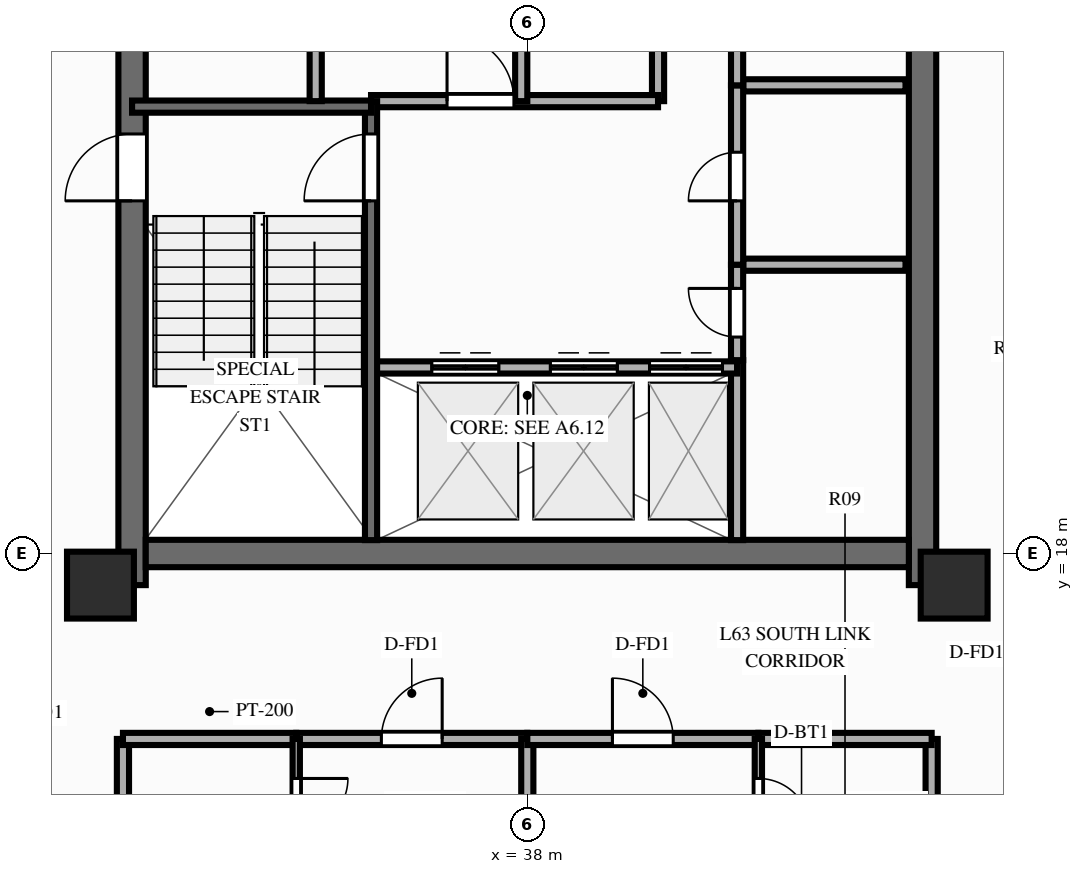
"""IFC4 building model, lengths in metres.
Left out: names, types, materials, properties, quantities, classifications, styles, units other than length and angle.
Written with IfcOpenShell. Run it as: python <this file> out.ifc"""

import sys

from ifc_helpers import new_model, si_unit, direction, frame, frame_2d, origin, origin_2d, place, context, subcontext, project, spatial, rectangle, extrude, source, transform, mapped, element, fill, save


model = new_model("IFC4")
c1 = context("Model", 3, precision=1e-05, world=origin(), true_north=direction((0.0, 1.0)))
c2 = subcontext(c1, "Body", "Model", "MODEL_VIEW")
j1 = project(units=[si_unit("LENGTHUNIT", "METRE"), si_unit("PLANEANGLEUNIT", "RADIAN")], contexts=[c1])
p1 = place(None, origin())
s1 = spatial("IfcSite", under=j1, at=p1, CompositionType="ELEMENT")
p2 = place(p1, origin())
s2 = spatial("IfcBuilding", under=s1, at=p2, CompositionType="ELEMENT")
p3 = place(p2, frame((0.0, 0.0, 202.6)))
s3 = spatial("IfcBuildingStorey", under=s2, at=p3, CompositionType="ELEMENT", Elevation=202.6)
p4 = place(p3, frame((31.5, 17.48, 0.0), z_axis=(0.0, 0.0, 1.0), x_axis=(0.0, 1.0, 0.0)))
e1 = element("IfcWall", 1, at=p4, inside=s3, PredefinedType="SHEAR", context=c2, shape_type="SweptSolid", body=[
    extrude(rectangle(XDim=19.04, YDim=0.45, at=frame_2d((9.52, 0.0))), origin(), (0.0, 0.0, 1.0), 3.9),
])
p5 = place(p4, frame((6.32, 0.0, 0.0)))
e2 = element("IfcOpeningElement", 2, at=p5, cuts=e1, PredefinedType="OPENING", context=c2, shape_type="SweptSolid", body=[
    extrude(rectangle(XDim=1.1, YDim=2.15, at=frame_2d((0.55, 1.075))), frame((0.0, 0.237, 0.0), z_axis=(0.0, -1.0, 0.0), x_axis=(1.0, 0.0, 0.0)), (0.0, 0.0, 1.0), 0.474),
])
p6 = place(p3, frame((44.5, 17.48, 0.0), z_axis=(0.0, 0.0, 1.0), x_axis=(0.0, 1.0, 0.0)))
e3 = element("IfcWall", 3, at=p6, inside=s3, PredefinedType="SHEAR", context=c2, shape_type="SweptSolid", body=[
    extrude(rectangle(XDim=19.04, YDim=0.45, at=frame_2d((9.52, 0.0))), origin(), (0.0, 0.0, 1.0), 3.9),
])
p7 = place(p6, frame((12.67, 0.0, 0.0), z_axis=(0.0, 0.0, 1.0), x_axis=(-1.0, 0.0, 0.0)))
e4 = element("IfcOpeningElement", 4, at=p7, cuts=e3, PredefinedType="OPENING", context=c2, shape_type="SweptSolid", body=[
    extrude(rectangle(XDim=1.1, YDim=2.15, at=frame_2d((0.55, 1.075))), frame((0.0, 0.237, 0.0), z_axis=(0.0, -1.0, 0.0), x_axis=(1.0, 0.0, 0.0)), (0.0, 0.0, 1.0), 0.474),
])
p8 = place(p3, frame((31.725, 18.0, 0.0), z_axis=(0.0, 0.0, 1.0), x_axis=(1.0, 0.0, 0.0)))
e5 = element("IfcWall", 5, at=p8, inside=s3, PredefinedType="SHEAR", context=c2, shape_type="SweptSolid", body=[
    extrude(rectangle(XDim=12.55, YDim=0.45, at=frame_2d((6.275, 0.0))), origin(), (0.0, 0.0, 1.0), 3.9),
])
m1 = source(origin(), c2, "Body", "SweptSolid", [
    extrude(rectangle(XDim=1.1, YDim=1.1, at=origin_2d()), origin(), (0.0, 0.0, 1.0), 3.9),
])
for number, where, z_axis, x_axis in (
    (6, (30.98, 17.48, 0.0), (0.0, 0.0, 1.0), (1.0, 0.0, 0.0)),
    (7, (45.02, 17.48, 0.0), (0.0, 0.0, 1.0), (1.0, 0.0, 0.0)),
):
    element("IfcColumn", number, at=place(p3, frame(where, z_axis=z_axis, x_axis=x_axis)), inside=s3, PredefinedType="COLUMN", context=c2, shape_type="MappedRepresentation", body=[
        mapped(m1, transform((0.0, 0.0, 0.0), scale=1.0)),
    ])
p9 = place(p3, frame((41.55, 22.75, 0.0), z_axis=(0.0, 0.0, 1.0), x_axis=(1.0, 0.0, 0.0)))
e8 = element("IfcWall", 8, at=p9, inside=s3, PredefinedType="PARTITIONING", context=c2, shape_type="SweptSolid", body=[
    extrude(rectangle(XDim=2.67, YDim=0.2, at=frame_2d((1.335, 0.0))), origin(), (0.0, 0.0, 1.0), 3.6),
])
p10 = place(p3, frame((41.55, 25.7, 0.0), z_axis=(0.0, 0.0, 1.0), x_axis=(1.0, 0.0, 0.0)))
e9 = element("IfcWall", 9, at=p10, inside=s3, PredefinedType="PARTITIONING", context=c2, shape_type="SweptSolid", body=[
    extrude(rectangle(XDim=2.67, YDim=0.2, at=frame_2d((1.335, 0.0))), origin(), (0.0, 0.0, 1.0), 3.04),
])
p11 = place(p3, frame((41.45, 18.22, 0.0), z_axis=(0.0, 0.0, 1.0), x_axis=(0.0, 1.0, 0.0)))
e10 = element("IfcWall", 10, at=p11, inside=s3, PredefinedType="PARTITIONING", context=c2, shape_type="SweptSolid", body=[
    extrude(rectangle(XDim=2.96, YDim=0.2, at=frame_2d((1.48, 0.0))), origin(), (0.0, 0.0, 1.0), 3.6),
])
p12 = place(p3, frame((41.45, 21.18, 0.0), z_axis=(0.0, 0.0, 1.0), x_axis=(0.0, 1.0, 0.0)))
e11 = element("IfcWall", 11, at=p12, inside=s3, PredefinedType="PARTITIONING", context=c2, shape_type="SweptSolid", body=[
    extrude(rectangle(XDim=1.57, YDim=0.2, at=frame_2d((0.785, 0.0))), origin(), (0.0, 0.0, 1.0), 3.6),
])
p13 = place(p12, frame((0.38, 0.0, 0.0)))
e12 = element("IfcOpeningElement", 12, at=p13, cuts=e11, PredefinedType="OPENING", context=c2, shape_type="SweptSolid", body=[
    extrude(rectangle(XDim=0.8, YDim=2.05, at=frame_2d((0.4, 1.025))), frame((0.0, 0.112, 0.0), z_axis=(0.0, -1.0, 0.0), x_axis=(1.0, 0.0, 0.0)), (0.0, 0.0, 1.0), 0.224),
])
p14 = place(p3, frame((41.45, 22.75, 0.0), z_axis=(0.0, 0.0, 1.0), x_axis=(0.0, 1.0, 0.0)))
e13 = element("IfcWall", 13, at=p14, inside=s3, PredefinedType="PARTITIONING", context=c2, shape_type="SweptSolid", body=[
    extrude(rectangle(XDim=2.95, YDim=0.2, at=frame_2d((1.475, 0.0))), origin(), (0.0, 0.0, 1.0), 3.6),
])
p15 = place(p14, frame((1.05, 0.0, 0.0)))
e14 = element("IfcOpeningElement", 14, at=p15, cuts=e13, PredefinedType="OPENING", context=c2, shape_type="SweptSolid", body=[
    extrude(rectangle(XDim=0.8, YDim=2.05, at=frame_2d((0.4, 1.025))), frame((0.0, 0.112, 0.0), z_axis=(0.0, -1.0, 0.0), x_axis=(1.0, 0.0, 0.0)), (0.0, 0.0, 1.0), 0.224),
])
p16 = place(p3, frame((41.45, 25.7, 0.0), z_axis=(0.0, 0.0, 1.0), x_axis=(0.0, 1.0, 0.0)))
e15 = element("IfcWall", 15, at=p16, inside=s3, PredefinedType="PARTITIONING", context=c2, shape_type="SweptSolid", body=[
    extrude(rectangle(XDim=2.9, YDim=0.2, at=frame_2d((1.45, 0.0))), origin(), (0.0, 0.0, 1.0), 3.6),
])
p17 = place(p16, frame((1.0, 0.0, 0.0)))
e16 = element("IfcOpeningElement", 16, at=p17, cuts=e15, PredefinedType="OPENING", context=c2, shape_type="SweptSolid", body=[
    extrude(rectangle(XDim=0.9, YDim=2.1, at=frame_2d((0.45, 1.05))), frame((0.0, 0.112, 0.0), z_axis=(0.0, -1.0, 0.0), x_axis=(1.0, 0.0, 0.0)), (0.0, 0.0, 1.0), 0.224),
])
p18 = place(p3, frame((40.15, 25.44, 0.0), z_axis=(0.0, 0.0, 1.0), x_axis=(0.0, 1.0, 0.0)))
e17 = element("IfcWall", 17, at=p18, inside=s3, PredefinedType="PARTITIONING", context=c2, shape_type="SweptSolid", body=[
    extrude(rectangle(XDim=6.36, YDim=0.2, at=frame_2d((3.18, 0.0))), origin(), (0.0, 0.0, 1.0), 3.6),
])
p19 = place(p3, frame((35.43, 21.06, 0.0), z_axis=(0.0, 0.0, 1.0), x_axis=(1.0, 0.0, 0.0)))
e18 = element("IfcWall", 18, at=p19, inside=s3, PredefinedType="PARTITIONING", context=c2, shape_type="SweptSolid", body=[
    extrude(rectangle(XDim=6.02, YDim=0.2, at=frame_2d((3.01, 0.0))), origin(), (0.0, 0.0, 1.0), 3.6),
])
p20 = place(p19, frame((1.0, 0.0, 0.0)))
e19 = element("IfcOpeningElement", 19, at=p20, cuts=e18, PredefinedType="OPENING", context=c2, shape_type="SweptSolid", body=[
    extrude(rectangle(XDim=1.1, YDim=2.15, at=frame_2d((0.55, 1.075))), frame((0.0, 0.112, 0.0), z_axis=(0.0, -1.0, 0.0), x_axis=(1.0, 0.0, 0.0)), (0.0, 0.0, 1.0), 0.224),
])
p21 = place(p19, frame((2.95, 0.0, 0.0)))
e20 = element("IfcOpeningElement", 20, at=p21, cuts=e18, PredefinedType="OPENING", context=c2, shape_type="SweptSolid", body=[
    extrude(rectangle(XDim=1.1, YDim=2.15, at=frame_2d((0.55, 1.075))), frame((0.0, 0.112, 0.0), z_axis=(0.0, -1.0, 0.0), x_axis=(1.0, 0.0, 0.0)), (0.0, 0.0, 1.0), 0.224),
])
p22 = place(p19, frame((4.58, 0.0, 0.0)))
e21 = element("IfcOpeningElement", 21, at=p22, cuts=e18, PredefinedType="OPENING", context=c2, shape_type="SweptSolid", body=[
    extrude(rectangle(XDim=1.2, YDim=2.15, at=frame_2d((0.6, 1.075))), frame((0.0, 0.112, 0.0), z_axis=(0.0, -1.0, 0.0), x_axis=(1.0, 0.0, 0.0)), (0.0, 0.0, 1.0), 0.224),
])
p23 = place(p3, frame((35.43, 25.44, 0.0), z_axis=(0.0, 0.0, 1.0), x_axis=(1.0, 0.0, 0.0)))
e22 = element("IfcWall", 22, at=p23, inside=s3, PredefinedType="PARTITIONING", context=c2, shape_type="SweptSolid", body=[
    extrude(rectangle(XDim=4.72, YDim=0.2, at=frame_2d((2.36, 0.0))), origin(), (0.0, 0.0, 1.0), 3.6),
])
p24 = place(p23, frame((1.25, 0.0, 0.0)))
e23 = element("IfcOpeningElement", 23, at=p24, cuts=e22, PredefinedType="OPENING", context=c2, shape_type="SweptSolid", body=[
    extrude(rectangle(XDim=1.1, YDim=2.15, at=frame_2d((0.55, 1.075))), frame((0.0, 0.112, 0.0), z_axis=(0.0, -1.0, 0.0), x_axis=(1.0, 0.0, 0.0)), (0.0, 0.0, 1.0), 0.224),
])
p25 = place(p3, frame((35.43, 18.22, 0.0), z_axis=(0.0, 0.0, 1.0), x_axis=(0.0, 1.0, 0.0)))
e24 = element("IfcWall", 24, at=p25, inside=s3, PredefinedType="SOLIDWALL", context=c2, shape_type="SweptSolid", body=[
    extrude(rectangle(XDim=7.22, YDim=0.2, at=frame_2d((3.61, 0.0))), origin(), (0.0, 0.0, 1.0), 3.6),
])
p26 = place(p25, frame((6.68, 0.0, 0.0), z_axis=(0.0, 0.0, 1.0), x_axis=(-1.0, 0.0, 0.0)))
e25 = element("IfcOpeningElement", 25, at=p26, cuts=e24, PredefinedType="OPENING", context=c2, shape_type="SweptSolid", body=[
    extrude(rectangle(XDim=1.1, YDim=2.15, at=frame_2d((0.55, 1.075))), frame((0.0, 0.112, 0.0), z_axis=(0.0, -1.0, 0.0), x_axis=(1.0, 0.0, 0.0)), (0.0, 0.0, 1.0), 0.224),
])
p27 = place(p3, frame((31.5, 25.35, 0.0), z_axis=(0.0, 0.0, 1.0), x_axis=(1.0, 0.0, 0.0)))
e26 = element("IfcWall", 26, at=p27, inside=s3, PredefinedType="SOLIDWALL", context=c2, shape_type="SweptSolid", body=[
    extrude(rectangle(XDim=3.93, YDim=0.2, at=frame_2d((1.965, 0.0))), origin(), (0.0, 0.0, 1.0), 3.6),
])
p28 = place(p3, frame((34.52, 25.44, 0.0), z_axis=(0.0, 0.0, 1.0), x_axis=(0.0, 1.0, 0.0)))
e27 = element("IfcWall", 27, at=p28, inside=s3, PredefinedType="PARTITIONING", context=c2, shape_type="SweptSolid", body=[
    extrude(rectangle(XDim=10.34, YDim=0.2, at=frame_2d((5.17, 0.0))), origin(), (0.0, 0.0, 1.0), 3.6),
])
p29 = place(p28, frame((1.15, 0.0, 0.0)))
e28 = element("IfcOpeningElement", 28, at=p29, cuts=e27, PredefinedType="OPENING", context=c2, shape_type="SweptSolid", body=[
    extrude(rectangle(XDim=0.9, YDim=2.1, at=frame_2d((0.45, 1.05))), frame((0.0, 0.112, 0.0), z_axis=(0.0, -1.0, 0.0), x_axis=(1.0, 0.0, 0.0)), (0.0, 0.0, 1.0), 0.224),
])
p30 = place(p28, frame((4.35, 0.0, 0.0)))
e29 = element("IfcOpeningElement", 29, at=p30, cuts=e27, PredefinedType="OPENING", context=c2, shape_type="SweptSolid", body=[
    extrude(rectangle(XDim=0.9, YDim=2.1, at=frame_2d((0.45, 1.05))), frame((0.0, 0.112, 0.0), z_axis=(0.0, -1.0, 0.0), x_axis=(1.0, 0.0, 0.0)), (0.0, 0.0, 1.0), 0.224),
])
p31 = place(p28, frame((7.01, 0.0, 0.0)))
e30 = element("IfcOpeningElement", 30, at=p31, cuts=e27, PredefinedType="OPENING", context=c2, shape_type="SweptSolid", body=[
    extrude(rectangle(XDim=1.0, YDim=2.15, at=frame_2d((0.5, 1.075))), frame((0.0, 0.112, 0.0), z_axis=(0.0, -1.0, 0.0), x_axis=(1.0, 0.0, 0.0)), (0.0, 0.0, 1.0), 0.224),
])
p32 = place(p28, frame((8.76, 0.0, 0.0)))
e31 = element("IfcOpeningElement", 31, at=p32, cuts=e27, PredefinedType="OPENING", context=c2, shape_type="SweptSolid", body=[
    extrude(rectangle(XDim=1.0, YDim=2.15, at=frame_2d((0.5, 1.075))), frame((0.0, 0.112, 0.0), z_axis=(0.0, -1.0, 0.0), x_axis=(1.0, 0.0, 0.0)), (0.0, 0.0, 1.0), 0.224),
])
p33 = place(p3, frame((37.9, 25.44, 0.0), z_axis=(0.0, 0.0, 1.0), x_axis=(0.0, 1.0, 0.0)))
e32 = element("IfcWall", 32, at=p33, inside=s3, PredefinedType="PARTITIONING", context=c2, shape_type="SweptSolid", body=[
    extrude(rectangle(XDim=10.34, YDim=0.2, at=frame_2d((5.17, 0.0))), origin(), (0.0, 0.0, 1.0), 3.6),
])
p34 = place(p33, frame((2.6, 0.0, 0.0)))
e33 = element("IfcOpeningElement", 33, at=p34, cuts=e32, PredefinedType="OPENING", context=c2, shape_type="SweptSolid", body=[
    extrude(rectangle(XDim=0.9, YDim=2.1, at=frame_2d((0.45, 1.05))), frame((0.0, 0.112, 0.0), z_axis=(0.0, -1.0, 0.0), x_axis=(1.0, 0.0, 0.0)), (0.0, 0.0, 1.0), 0.224),
])
p35 = place(p33, frame((6.86, 0.0, 0.0)))
e34 = element("IfcOpeningElement", 34, at=p35, cuts=e32, PredefinedType="OPENING", context=c2, shape_type="SweptSolid", body=[
    extrude(rectangle(XDim=1.0, YDim=2.15, at=frame_2d((0.5, 1.075))), frame((0.0, 0.112, 0.0), z_axis=(0.0, -1.0, 0.0), x_axis=(1.0, 0.0, 0.0)), (0.0, 0.0, 1.0), 0.224),
])
p36 = place(p33, frame((8.71, 0.0, 0.0)))
e35 = element("IfcOpeningElement", 35, at=p36, cuts=e32, PredefinedType="OPENING", context=c2, shape_type="SweptSolid", body=[
    extrude(rectangle(XDim=1.0, YDim=2.15, at=frame_2d((0.5, 1.075))), frame((0.0, 0.112, 0.0), z_axis=(0.0, -1.0, 0.0), x_axis=(1.0, 0.0, 0.0)), (0.0, 0.0, 1.0), 0.224),
])
for number, where, z_axis, x_axis in (
    (36, (31.35, 14.95, 0.0), (0.0, 0.0, 1.0), (0.0, -1.0, 0.0)),
    (37, (44.65, 14.95, 0.0), (0.0, 0.0, 1.0), (0.0, -1.0, 0.0)),
):
    element("IfcWall", number, at=place(p3, frame(where, z_axis=z_axis, x_axis=x_axis)), inside=s3, PredefinedType="PARTITIONING", context=c2, shape_type="SweptSolid", body=[
        extrude(rectangle(XDim=8.8, YDim=0.2, at=frame_2d((4.4, 0.0))), origin(), (0.0, 0.0, 1.0), 2.79),
    ])
p37 = place(p3, frame((31.35, 14.95, 0.0), z_axis=(0.0, 0.0, 1.0), x_axis=(1.0, 0.0, 0.0)))
e38 = element("IfcWall", 38, at=p37, inside=s3, PredefinedType="PARTITIONING", context=c2, shape_type="SweptSolid", body=[
    extrude(rectangle(XDim=2.85, YDim=0.2, at=frame_2d((1.425, 0.0))), origin(), (0.0, 0.0, 1.0), 3.6),
])
p38 = place(p3, frame((34.2, 14.95, 0.0), z_axis=(0.0, 0.0, 1.0), x_axis=(1.0, 0.0, 0.0)))
e39 = element("IfcWall", 39, at=p38, inside=s3, PredefinedType="PARTITIONING", context=c2, shape_type="SweptSolid", body=[
    extrude(rectangle(XDim=3.8, YDim=0.2, at=frame_2d((1.9, 0.0))), origin(), (0.0, 0.0, 1.0), 3.6),
])
p39 = place(p38, frame((1.4, 0.0, 0.0)))
e40 = element("IfcOpeningElement", 40, at=p39, cuts=e39, PredefinedType="OPENING", context=c2, shape_type="SweptSolid", body=[
    extrude(rectangle(XDim=1.0, YDim=2.15, at=frame_2d((0.5, 1.075))), frame((0.0, 0.112, 0.0), z_axis=(0.0, -1.0, 0.0), x_axis=(1.0, 0.0, 0.0)), (0.0, 0.0, 1.0), 0.224),
])
p40 = place(p3, frame((34.2, 14.95, 0.0), z_axis=(0.0, 0.0, 1.0), x_axis=(0.0, -1.0, 0.0)))
e41 = element("IfcWall", 41, at=p40, inside=s3, PredefinedType="PARTITIONING", context=c2, shape_type="SweptSolid", body=[
    extrude(rectangle(XDim=2.15, YDim=0.12, at=frame_2d((1.075, 0.0))), origin(), (0.0, 0.0, 1.0), 3.6),
])
p41 = place(p40, frame((0.65, 0.0, 0.0)))
e42 = element("IfcOpeningElement", 42, at=p41, cuts=e41, PredefinedType="OPENING", context=c2, shape_type="SweptSolid", body=[
    extrude(rectangle(XDim=0.85, YDim=2.05, at=frame_2d((0.425, 1.025))), frame((0.0, 0.072, 0.0), z_axis=(0.0, -1.0, 0.0), x_axis=(1.0, 0.0, 0.0)), (0.0, 0.0, 1.0), 0.144),
])
p42 = place(p3, frame((38.0, 14.95, 0.0), z_axis=(0.0, 0.0, 1.0), x_axis=(0.0, -1.0, 0.0)))
e43 = element("IfcWall", 43, at=p42, inside=s3, PredefinedType="PARTITIONING", context=c2, shape_type="SweptSolid", body=[
    extrude(rectangle(XDim=8.8, YDim=0.2, at=frame_2d((4.4, 0.0))), origin(), (0.0, 0.0, 1.0), 3.6),
])
p43 = place(p3, frame((38.0, 14.95, 0.0), z_axis=(0.0, 0.0, 1.0), x_axis=(1.0, 0.0, 0.0)))
e44 = element("IfcWall", 44, at=p43, inside=s3, PredefinedType="PARTITIONING", context=c2, shape_type="SweptSolid", body=[
    extrude(rectangle(XDim=3.8, YDim=0.2, at=frame_2d((1.9, 0.0))), origin(), (0.0, 0.0, 1.0), 3.6),
])
p44 = place(p43, frame((1.4, 0.0, 0.0)))
e45 = element("IfcOpeningElement", 45, at=p44, cuts=e44, PredefinedType="OPENING", context=c2, shape_type="SweptSolid", body=[
    extrude(rectangle(XDim=1.0, YDim=2.15, at=frame_2d((0.5, 1.075))), frame((0.0, 0.112, 0.0), z_axis=(0.0, -1.0, 0.0), x_axis=(1.0, 0.0, 0.0)), (0.0, 0.0, 1.0), 0.224),
])
p45 = place(p3, frame((41.8, 14.95, 0.0), z_axis=(0.0, 0.0, 1.0), x_axis=(1.0, 0.0, 0.0)))
e46 = element("IfcWall", 46, at=p45, inside=s3, PredefinedType="PARTITIONING", context=c2, shape_type="SweptSolid", body=[
    extrude(rectangle(XDim=2.85, YDim=0.2, at=frame_2d((1.425, 0.0))), origin(), (0.0, 0.0, 1.0), 3.6),
])
p46 = place(p3, frame((41.8, 14.95, 0.0), z_axis=(0.0, 0.0, 1.0), x_axis=(0.0, -1.0, 0.0)))
e47 = element("IfcWall", 47, at=p46, inside=s3, PredefinedType="PARTITIONING", context=c2, shape_type="SweptSolid", body=[
    extrude(rectangle(XDim=2.15, YDim=0.12, at=frame_2d((1.075, 0.0))), origin(), (0.0, 0.0, 1.0), 3.6),
])
p47 = place(p46, frame((0.65, 0.0, 0.0)))
e48 = element("IfcOpeningElement", 48, at=p47, cuts=e47, PredefinedType="OPENING", context=c2, shape_type="SweptSolid", body=[
    extrude(rectangle(XDim=0.85, YDim=2.05, at=frame_2d((0.425, 1.025))), frame((0.0, 0.072, 0.0), z_axis=(0.0, -1.0, 0.0), x_axis=(1.0, 0.0, 0.0)), (0.0, 0.0, 1.0), 0.144),
])
m2 = source(origin(), c2, "Body", "SweptSolid", [
    extrude(rectangle(XDim=1.1, YDim=2.15, at=frame_2d((0.55, 1.075))), frame((0.0, 0.025, 0.0), z_axis=(0.0, -1.0, 0.0), x_axis=(1.0, 0.0, 0.0)), (0.0, 0.0, 1.0), 0.05),
])
p48 = place(p5, origin())
e49 = element("IfcDoor", 49, at=p48, inside=s3, OperationType="SINGLE_SWING_LEFT", PredefinedType="DOOR", context=c2, shape_type="MappedRepresentation", body=[
    mapped(m2, transform((0.0, 0.0, 0.0), scale=1.0)),
])
fill(e2, e49)
m3 = source(origin(), c2, "Body", "SweptSolid", [
    extrude(rectangle(XDim=0.8, YDim=2.05, at=frame_2d((0.4, 1.025))), frame((0.0, 0.025, 0.0), z_axis=(0.0, -1.0, 0.0), x_axis=(1.0, 0.0, 0.0)), (0.0, 0.0, 1.0), 0.05),
])
p49 = place(p13, origin())
e50 = element("IfcDoor", 50, at=p49, inside=s3, OperationType="SINGLE_SWING_RIGHT", PredefinedType="DOOR", context=c2, shape_type="MappedRepresentation", body=[
    mapped(m3, transform((0.0, 0.0, 0.0), scale=1.0)),
])
fill(e12, e50)
p50 = place(p15, origin())
e51 = element("IfcDoor", 51, at=p50, inside=s3, OperationType="SINGLE_SWING_LEFT", PredefinedType="DOOR", context=c2, shape_type="MappedRepresentation", body=[
    mapped(m3, transform((0.0, 0.0, 0.0), scale=1.0)),
])
fill(e14, e51)
p51 = place(p20, origin())
e52 = element("IfcDoor", 52, at=p51, inside=s3, OperationType="DOUBLE_DOOR_SLIDING", PredefinedType="DOOR", context=c2, shape_type="MappedRepresentation", body=[
    mapped(m2, transform((0.0, 0.0, 0.0), scale=1.0)),
])
fill(e19, e52)
p52 = place(p21, origin())
e53 = element("IfcDoor", 53, at=p52, inside=s3, OperationType="DOUBLE_DOOR_SLIDING", PredefinedType="DOOR", context=c2, shape_type="MappedRepresentation", body=[
    mapped(m2, transform((0.0, 0.0, 0.0), scale=1.0)),
])
fill(e20, e53)
m4 = source(origin(), c2, "Body", "SweptSolid", [
    extrude(rectangle(XDim=1.2, YDim=2.15, at=frame_2d((0.6, 1.075))), frame((0.0, 0.025, 0.0), z_axis=(0.0, -1.0, 0.0), x_axis=(1.0, 0.0, 0.0)), (0.0, 0.0, 1.0), 0.05),
])
p53 = place(p22, origin())
e54 = element("IfcDoor", 54, at=p53, inside=s3, OperationType="DOUBLE_DOOR_SLIDING", PredefinedType="DOOR", context=c2, shape_type="MappedRepresentation", body=[
    mapped(m4, transform((0.0, 0.0, 0.0), scale=1.0)),
])
fill(e21, e54)
p54 = place(p24, origin())
e55 = element("IfcDoor", 55, at=p54, inside=s3, OperationType="SINGLE_SWING_LEFT", PredefinedType="DOOR", context=c2, shape_type="MappedRepresentation", body=[
    mapped(m2, transform((0.0, 0.0, 0.0), scale=1.0)),
])
fill(e23, e55)
p55 = place(p26, origin())
e56 = element("IfcDoor", 56, at=p55, inside=s3, OperationType="SINGLE_SWING_RIGHT", PredefinedType="DOOR", context=c2, shape_type="MappedRepresentation", body=[
    mapped(m2, transform((0.0, 0.0, 0.0), scale=1.0)),
])
fill(e25, e56)
m5 = source(origin(), c2, "Body", "SweptSolid", [
    extrude(rectangle(XDim=1.0, YDim=2.15, at=frame_2d((0.5, 1.075))), frame((0.0, 0.025, 0.0), z_axis=(0.0, -1.0, 0.0), x_axis=(1.0, 0.0, 0.0)), (0.0, 0.0, 1.0), 0.05),
])
p56 = place(p39, origin())
e57 = element("IfcDoor", 57, at=p56, inside=s3, OperationType="SINGLE_SWING_RIGHT", PredefinedType="DOOR", context=c2, shape_type="MappedRepresentation", body=[
    mapped(m5, transform((0.0, 0.0, 0.0), scale=1.0)),
])
fill(e40, e57)
m6 = source(origin(), c2, "Body", "SweptSolid", [
    extrude(rectangle(XDim=0.85, YDim=2.05, at=frame_2d((0.425, 1.025))), frame((0.0, 0.025, 0.0), z_axis=(0.0, -1.0, 0.0), x_axis=(1.0, 0.0, 0.0)), (0.0, 0.0, 1.0), 0.05),
])
p57 = place(p41, origin())
e58 = element("IfcDoor", 58, at=p57, inside=s3, OperationType="SINGLE_SWING_LEFT", PredefinedType="DOOR", context=c2, shape_type="MappedRepresentation", body=[
    mapped(m6, transform((0.0, 0.0, 0.0), scale=1.0)),
])
fill(e42, e58)
p58 = place(p44, origin())
e59 = element("IfcDoor", 59, at=p58, inside=s3, OperationType="SINGLE_SWING_LEFT", PredefinedType="DOOR", context=c2, shape_type="MappedRepresentation", body=[
    mapped(m5, transform((0.0, 0.0, 0.0), scale=1.0)),
])
fill(e45, e59)
p59 = place(p47, origin())
e60 = element("IfcDoor", 60, at=p59, inside=s3, OperationType="SINGLE_SWING_RIGHT", PredefinedType="DOOR", context=c2, shape_type="MappedRepresentation", body=[
    mapped(m6, transform((0.0, 0.0, 0.0), scale=1.0)),
])
fill(e48, e60)
save(model, sys.argv[1])
